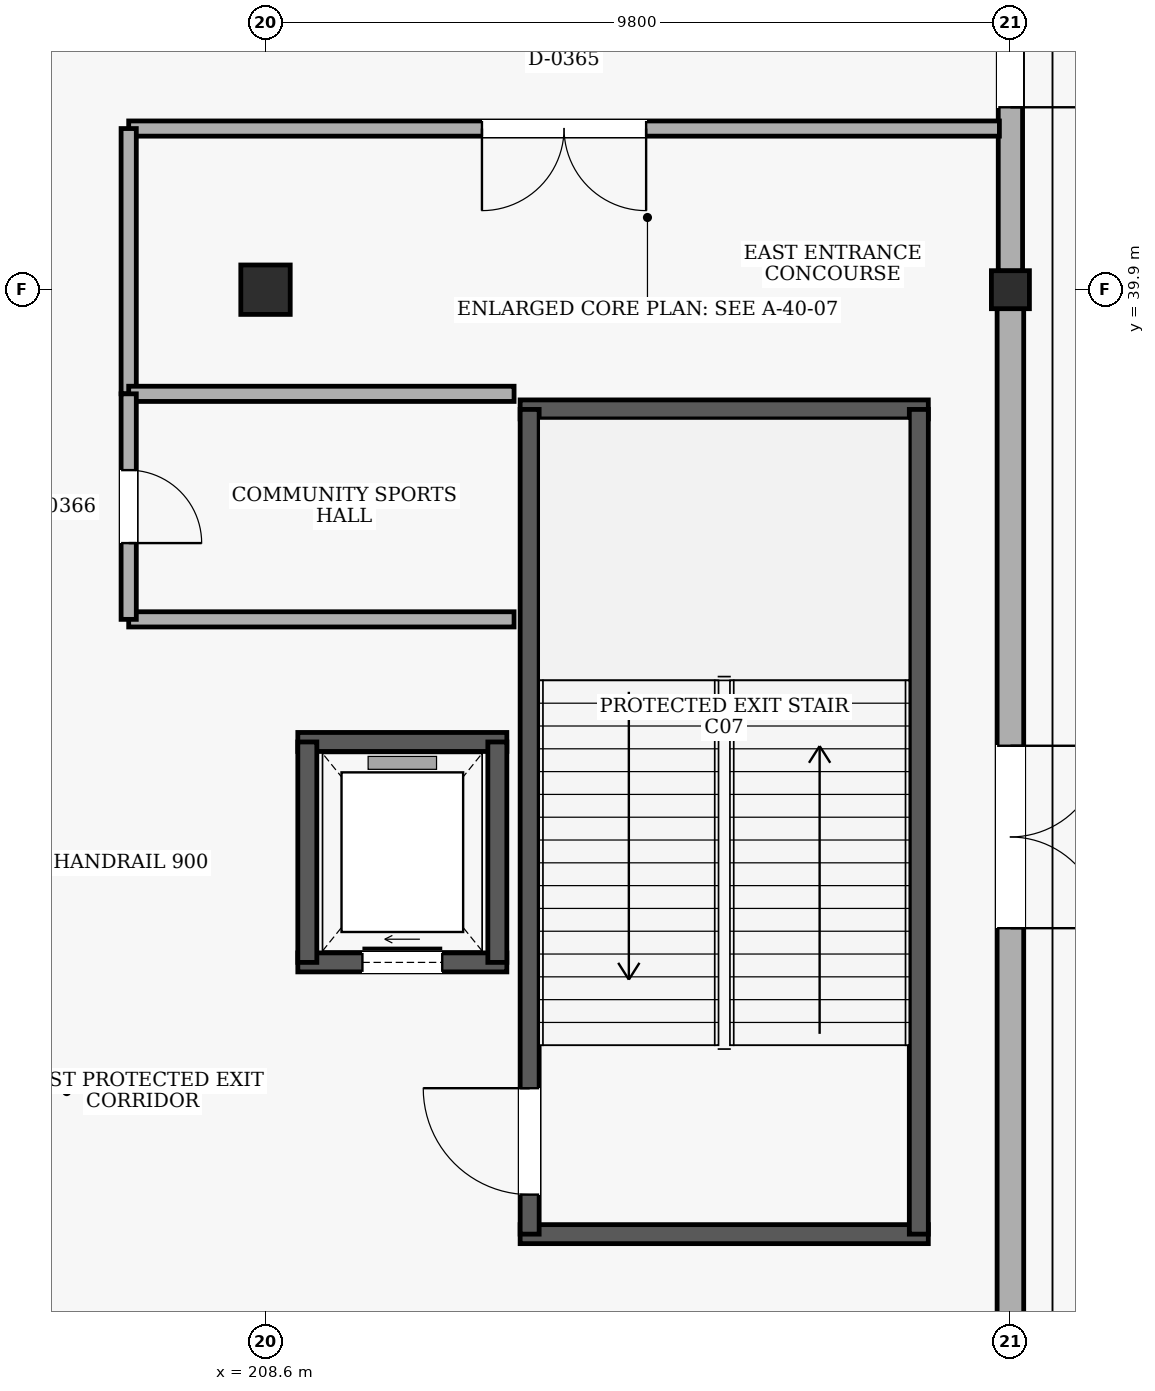
"""IFC4 building model, lengths in metres.
Left out: names, types, materials, properties, quantities, classifications, styles, units other than length and angle.
Written with IfcOpenShell. Run it as: python <this file> out.ifc"""

import sys

from ifc_helpers import new_model, si_unit, direction, frame, frame_2d, origin, origin_2d, place, context, subcontext, project, spatial, rectangle, extrude, element, fill, save


model = new_model("IFC4")
c1 = context("Model", 3, precision=1e-05, world=origin(), true_north=direction((0.0, 1.0)))
c2 = subcontext(c1, "Body", "Model", "MODEL_VIEW")
j1 = project(units=[si_unit("LENGTHUNIT", "METRE"), si_unit("PLANEANGLEUNIT", "RADIAN")], contexts=[c1])
p1 = place(None, origin())
s1 = spatial("IfcSite", under=j1, at=p1, CompositionType="ELEMENT")
p2 = place(p1, origin())
s2 = spatial("IfcBuilding", under=s1, at=p2, CompositionType="ELEMENT")
p3 = place(p2, origin())
s3 = spatial("IfcBuildingStorey", under=s2, at=p3, CompositionType="ELEMENT", Elevation=0.0)
p4 = place(p3, frame((208.6, 39.9, 0.0), z_axis=(0.0, 0.0, 1.0), x_axis=(1.0, 0.0, 0.0)))
e1 = element("IfcColumn", 1, at=p4, inside=s3, PredefinedType="COLUMN", context=c2, shape_type="SweptSolid", body=[
    extrude(rectangle(XDim=0.65, YDim=0.65, at=origin_2d()), origin(), (0.0, 0.0, 1.0), 5.4),
])
p5 = place(p3, frame((218.4, 39.9, 0.0), z_axis=(0.0, 0.0, 1.0), x_axis=(1.0, 0.0, 0.0)))
e2 = element("IfcColumn", 2, at=p5, inside=s3, PredefinedType="COLUMN", context=c2, shape_type="SweptSolid", body=[
    extrude(rectangle(XDim=0.5, YDim=0.5, at=origin_2d()), origin(), (0.0, 0.0, 1.0), 5.4),
])
p6 = place(p3, frame((218.4, 46.855, 0.0), z_axis=(0.0, 0.0, 1.0), x_axis=(0.0, -1.0, 0.0)))
e3 = element("IfcWall", 3, at=p6, inside=s3, PredefinedType="SOLIDWALL", context=c2, shape_type="SweptSolid", body=[
    extrude(rectangle(XDim=6.71, YDim=0.32, at=frame_2d((3.355, 0.0))), origin(), (0.0, 0.0, 1.0), 4.46),
])
p7 = place(p6, frame((2.155, 0.0, 0.0)))
e4 = element("IfcOpeningElement", 4, at=p7, cuts=e3, PredefinedType="OPENING", context=c2, shape_type="SweptSolid", body=[
    extrude(rectangle(XDim=2.4, YDim=2.2, at=frame_2d((1.2, 1.1))), frame((0.0, 0.17, 0.0), z_axis=(0.0, -1.0, 0.0), x_axis=(1.0, 0.0, 0.0)), (0.0, 0.0, 1.0), 0.34),
])
p8 = place(p3, frame((218.4, 39.655, 0.0), z_axis=(0.0, 0.0, 1.0), x_axis=(0.0, -1.0, 0.0)))
e5 = element("IfcWall", 5, at=p8, inside=s3, PredefinedType="SOLIDWALL", context=c2, shape_type="SweptSolid", body=[
    extrude(rectangle(XDim=13.91, YDim=0.35, at=frame_2d((6.955, 0.0))), origin(), (0.0, 0.0, 1.0), 4.16),
])
p9 = place(p8, frame((5.755, 0.0, 0.0)))
e6 = element("IfcOpeningElement", 6, at=p9, cuts=e5, PredefinedType="OPENING", context=c2, shape_type="SweptSolid", body=[
    extrude(rectangle(XDim=2.4, YDim=2.2, at=frame_2d((1.2, 1.1))), frame((0.0, 0.185, 0.0), z_axis=(0.0, -1.0, 0.0), x_axis=(1.0, 0.0, 0.0)), (0.0, 0.0, 1.0), 0.37),
])
for number, where, z_axis, x_axis in (
    (7, (211.95, 27.475, 0.0), (0.0, 0.0, 1.0), (1.0, 0.0, 0.0)),
    (8, (217.32, 38.325, 0.0), (0.0, 0.0, 1.0), (-1.0, 0.0, 0.0)),
):
    element("IfcWall", number, at=place(p3, frame(where, z_axis=z_axis, x_axis=x_axis)), inside=s3, PredefinedType="SHEAR", context=c2, shape_type="SweptSolid", body=[
        extrude(rectangle(XDim=5.37, YDim=0.25, at=frame_2d((2.685, 0.0))), origin(), (0.0, 0.0, 1.0), 5.08),
    ])
p10 = place(p3, frame((212.075, 27.475, 0.0), z_axis=(0.0, 0.0, 1.0), x_axis=(0.0, 1.0, 0.0)))
e9 = element("IfcWall", 9, at=p10, inside=s3, PredefinedType="SHEAR", context=c2, shape_type="SweptSolid", body=[
    extrude(rectangle(XDim=10.85, YDim=0.25, at=frame_2d((5.425, 0.0))), origin(), (0.0, 0.0, 1.0), 5.08),
])
p11 = place(p10, frame((0.52, 0.0, 0.0)))
e10 = element("IfcOpeningElement", 10, at=p11, cuts=e9, PredefinedType="OPENING", context=c2, shape_type="SweptSolid", body=[
    extrude(rectangle(XDim=1.4, YDim=2.15, at=frame_2d((0.7, 1.075))), frame((0.0, 0.135, 0.0), z_axis=(0.0, -1.0, 0.0), x_axis=(1.0, 0.0, 0.0)), (0.0, 0.0, 1.0), 0.27),
])
p12 = place(p3, frame((217.195, 27.475, 0.0), z_axis=(0.0, 0.0, 1.0), x_axis=(0.0, 1.0, 0.0)))
e11 = element("IfcWall", 11, at=p12, inside=s3, PredefinedType="SHEAR", context=c2, shape_type="SweptSolid", body=[
    extrude(rectangle(XDim=10.85, YDim=0.25, at=frame_2d((5.425, 0.0))), origin(), (0.0, 0.0, 1.0), 5.08),
])
p13 = place(p3, frame((209.025, 31.05, 0.0), z_axis=(0.0, 0.0, 1.0), x_axis=(1.0, 0.0, 0.0)))
e12 = element("IfcWall", 12, at=p13, inside=s3, PredefinedType="SHEAR", context=c2, shape_type="SweptSolid", body=[
    extrude(rectangle(XDim=2.75, YDim=0.25, at=frame_2d((1.375, 0.0))), origin(), (0.0, 0.0, 1.0), 5.08),
])
p14 = place(p13, frame((0.85, 0.0, 0.0)))
e13 = element("IfcOpeningElement", 13, at=p14, cuts=e12, PredefinedType="OPENING", context=c2, shape_type="SweptSolid", body=[
    extrude(rectangle(XDim=1.05, YDim=2.15, at=frame_2d((0.525, 1.075))), frame((0.0, 0.135, 0.0), z_axis=(0.0, -1.0, 0.0), x_axis=(1.0, 0.0, 0.0)), (0.0, 0.0, 1.0), 0.27),
])
p15 = place(p3, frame((211.775, 33.95, 0.0), z_axis=(0.0, 0.0, 1.0), x_axis=(-1.0, 0.0, 0.0)))
e14 = element("IfcWall", 14, at=p15, inside=s3, PredefinedType="SHEAR", context=c2, shape_type="SweptSolid", body=[
    extrude(rectangle(XDim=2.75, YDim=0.25, at=frame_2d((1.375, 0.0))), origin(), (0.0, 0.0, 1.0), 5.08),
])
for number, where, z_axis, x_axis in (
    (15, (209.15, 33.95, 0.0), (0.0, 0.0, 1.0), (0.0, -1.0, 0.0)),
    (16, (211.65, 31.05, 0.0), (0.0, 0.0, 1.0), (0.0, 1.0, 0.0)),
):
    element("IfcWall", number, at=place(p3, frame(where, z_axis=z_axis, x_axis=x_axis)), inside=s3, PredefinedType="SHEAR", context=c2, shape_type="SweptSolid", body=[
        extrude(rectangle(XDim=2.9, YDim=0.25, at=frame_2d((1.45, 0.0))), origin(), (0.0, 0.0, 1.0), 5.08),
    ])
p16 = place(p3, frame((218.255, 42.02, 0.0), z_axis=(0.0, 0.0, 1.0), x_axis=(-1.0, 0.0, 0.0)))
e17 = element("IfcWall", 17, at=p16, inside=s3, PredefinedType="PARTITIONING", context=c2, shape_type="SweptSolid", body=[
    extrude(rectangle(XDim=11.455, YDim=0.2, at=frame_2d((5.728, 0.0))), origin(), (0.0, 0.0, 1.0), 5.08),
])
p17 = place(p16, frame((4.647, 0.0, 0.0)))
e18 = element("IfcOpeningElement", 18, at=p17, cuts=e17, PredefinedType="OPENING", context=c2, shape_type="SweptSolid", body=[
    extrude(rectangle(XDim=2.16, YDim=2.35, at=frame_2d((1.08, 1.175))), frame((0.0, 0.11, 0.0), z_axis=(0.0, -1.0, 0.0), x_axis=(1.0, 0.0, 0.0)), (0.0, 0.0, 1.0), 0.22),
])
p18 = place(p3, frame((206.8, 42.02, 0.0), z_axis=(0.0, 0.0, 1.0), x_axis=(0.0, -1.0, 0.0)))
e19 = element("IfcWall", 19, at=p18, inside=s3, PredefinedType="PARTITIONING", context=c2, shape_type="SweptSolid", body=[
    extrude(rectangle(XDim=3.49, YDim=0.2, at=frame_2d((1.745, 0.0))), origin(), (0.0, 0.0, 1.0), 5.08),
])
for number, where, z_axis, x_axis in (
    (20, (206.8, 35.563, 0.0), (0.0, 0.0, 1.0), (1.0, 0.0, 0.0)),
    (21, (211.87, 38.53, 0.0), (0.0, 0.0, 1.0), (-1.0, 0.0, 0.0)),
):
    element("IfcWall", number, at=place(p3, frame(where, z_axis=z_axis, x_axis=x_axis)), inside=s3, PredefinedType="PARTITIONING", context=c2, shape_type="SweptSolid", body=[
        extrude(rectangle(XDim=5.07, YDim=0.2, at=frame_2d((2.535, 0.0))), origin(), (0.0, 0.0, 1.0), 5.08),
    ])
p19 = place(p3, frame((206.8, 38.53, 0.0), z_axis=(0.0, 0.0, 1.0), x_axis=(0.0, -1.0, 0.0)))
e22 = element("IfcWall", 22, at=p19, inside=s3, PredefinedType="PARTITIONING", context=c2, shape_type="SweptSolid", body=[
    extrude(rectangle(XDim=2.967, YDim=0.2, at=frame_2d((1.483, 0.0))), origin(), (0.0, 0.0, 1.0), 5.08),
])
p20 = place(p19, frame((1.004, 0.0, 0.0)))
e23 = element("IfcOpeningElement", 23, at=p20, cuts=e22, PredefinedType="OPENING", context=c2, shape_type="SweptSolid", body=[
    extrude(rectangle(XDim=0.96, YDim=2.1, at=frame_2d((0.48, 1.05))), frame((0.0, 0.11, 0.0), z_axis=(0.0, -1.0, 0.0), x_axis=(1.0, 0.0, 0.0)), (0.0, 0.0, 1.0), 0.22),
])
p21 = place(p7, origin())
e24 = element("IfcDoor", 24, at=p21, inside=s3, OperationType="DOUBLE_DOOR_SINGLE_SWING", PredefinedType="DOOR", context=c2, shape_type="SweptSolid", body=[
    extrude(rectangle(XDim=2.4, YDim=2.2, at=frame_2d((1.2, 1.1))), frame((0.0, 0.025, 0.0), z_axis=(0.0, -1.0, 0.0), x_axis=(1.0, 0.0, 0.0)), (0.0, 0.0, 1.0), 0.05),
])
fill(e4, e24)
p22 = place(p9, origin())
e25 = element("IfcDoor", 25, at=p22, inside=s3, OperationType="DOUBLE_DOOR_SINGLE_SWING", PredefinedType="DOOR", context=c2, shape_type="SweptSolid", body=[
    extrude(rectangle(XDim=2.4, YDim=2.2, at=frame_2d((1.2, 1.1))), frame((0.0, 0.025, 0.0), z_axis=(0.0, -1.0, 0.0), x_axis=(1.0, 0.0, 0.0)), (0.0, 0.0, 1.0), 0.05),
])
fill(e6, e25)
p23 = place(p11, origin())
e26 = element("IfcDoor", 26, at=p23, inside=s3, OperationType="SINGLE_SWING_RIGHT", PredefinedType="DOOR", context=c2, shape_type="SweptSolid", body=[
    extrude(rectangle(XDim=1.4, YDim=2.15, at=frame_2d((0.7, 1.075))), frame((0.0, 0.025, 0.0), z_axis=(0.0, -1.0, 0.0), x_axis=(1.0, 0.0, 0.0)), (0.0, 0.0, 1.0), 0.05),
])
fill(e10, e26)
p24 = place(p14, origin())
e27 = element("IfcDoor", 27, at=p24, inside=s3, OperationType="SLIDING_TO_RIGHT", PredefinedType="DOOR", context=c2, shape_type="SweptSolid", body=[
    extrude(rectangle(XDim=1.05, YDim=2.15, at=frame_2d((0.525, 1.075))), frame((0.0, 0.025, 0.0), z_axis=(0.0, -1.0, 0.0), x_axis=(1.0, 0.0, 0.0)), (0.0, 0.0, 1.0), 0.05),
])
fill(e13, e27)
p25 = place(p17, origin())
e28 = element("IfcDoor", 28, at=p25, inside=s3, OperationType="DOUBLE_DOOR_SINGLE_SWING", PredefinedType="DOOR", context=c2, shape_type="SweptSolid", body=[
    extrude(rectangle(XDim=2.16, YDim=2.35, at=frame_2d((1.08, 1.175))), frame((0.0, 0.025, 0.0), z_axis=(0.0, -1.0, 0.0), x_axis=(1.0, 0.0, 0.0)), (0.0, 0.0, 1.0), 0.05),
])
fill(e18, e28)
p26 = place(p20, origin())
e29 = element("IfcDoor", 29, at=p26, inside=s3, OperationType="SINGLE_SWING_RIGHT", PredefinedType="DOOR", context=c2, shape_type="SweptSolid", body=[
    extrude(rectangle(XDim=0.96, YDim=2.1, at=frame_2d((0.48, 1.05))), frame((0.0, 0.025, 0.0), z_axis=(0.0, -1.0, 0.0), x_axis=(1.0, 0.0, 0.0)), (0.0, 0.0, 1.0), 0.05),
])
fill(e23, e29)
save(model, sys.argv[1])
